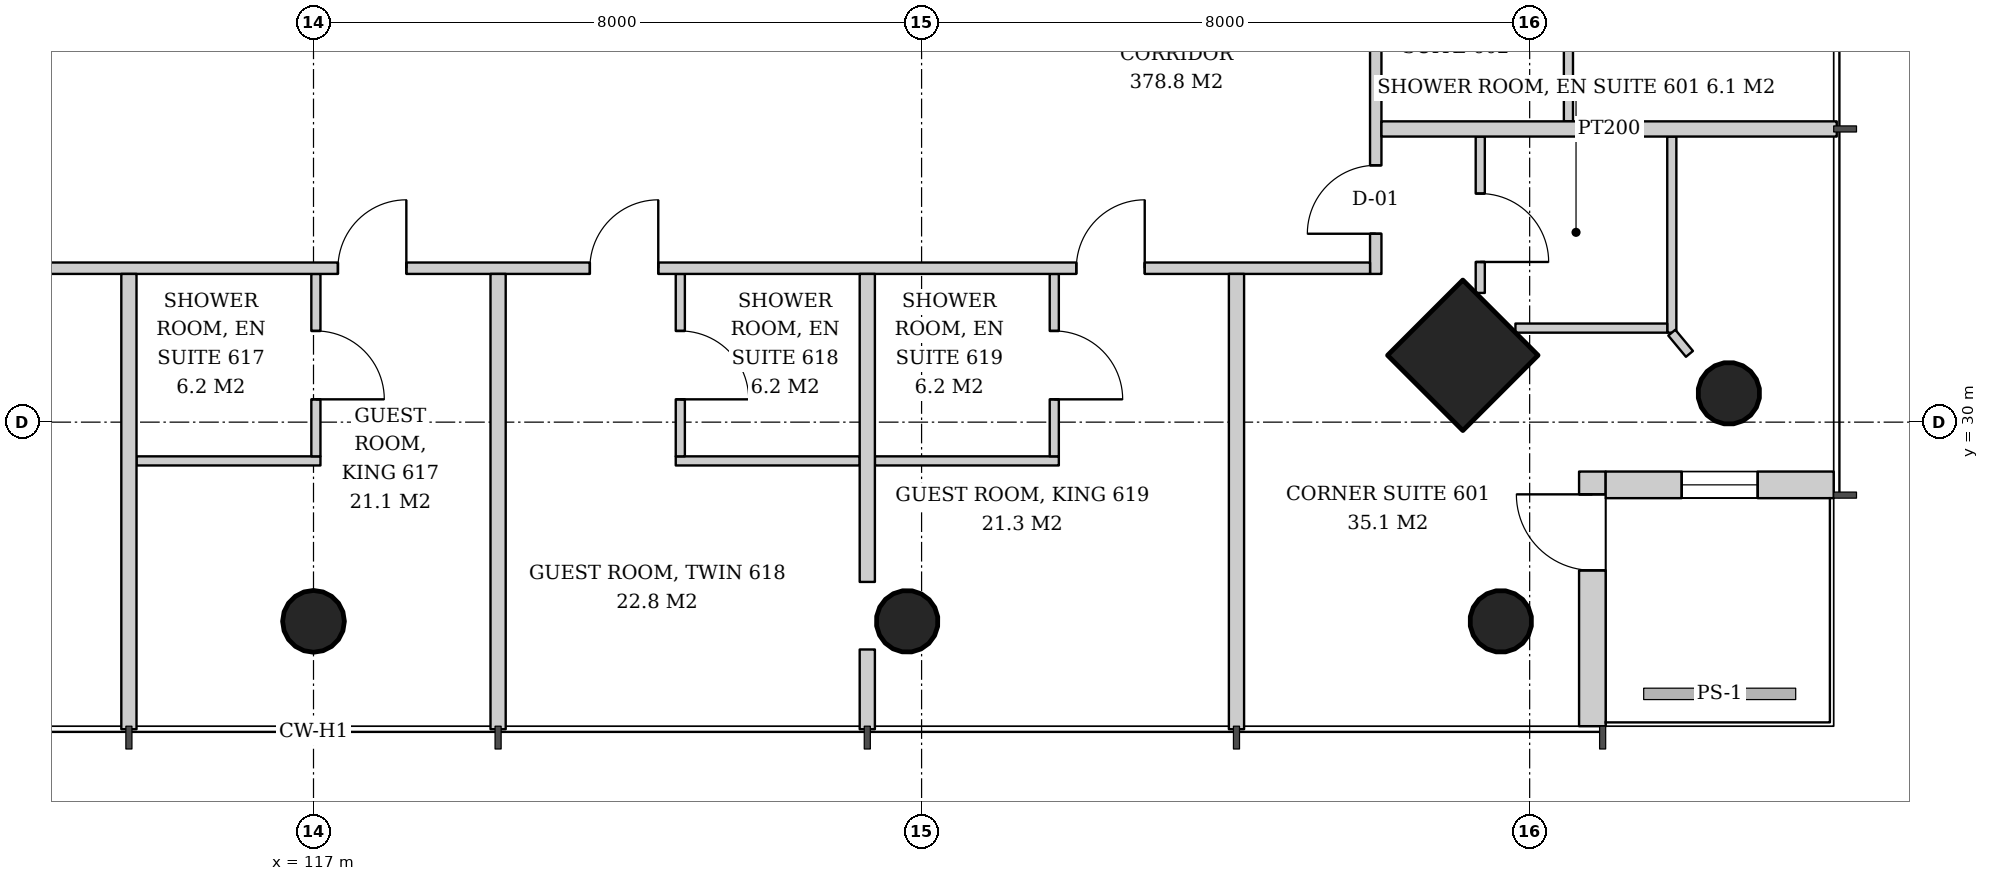
"""IFC4 building model, lengths in metres.
Left out: names, types, materials, properties, quantities, classifications, styles, units other than length and angle.
Written with IfcOpenShell. Run it as: python <this file> out.ifc"""

import sys

from ifc_helpers import new_model, si_unit, direction, frame, frame_2d, origin, origin_2d, place, context, subcontext, project, spatial, rectangle, hollow_circle, extrude, element, fill, save


model = new_model("IFC4")
c1 = context("Model", 3, precision=1e-05, world=origin(), true_north=direction((0.0, 1.0)))
c2 = subcontext(c1, "Body", "Model", "MODEL_VIEW")
j1 = project(units=[si_unit("LENGTHUNIT", "METRE"), si_unit("PLANEANGLEUNIT", "RADIAN")], contexts=[c1])
p1 = place(None, origin())
s1 = spatial("IfcSite", under=j1, at=p1, CompositionType="ELEMENT")
p2 = place(p1, origin())
s2 = spatial("IfcBuilding", under=s1, at=p2, CompositionType="ELEMENT")
p3 = place(p2, frame((0.0, 0.0, 28.6)))
s3 = spatial("IfcBuildingStorey", under=s2, at=p3, CompositionType="ELEMENT", Elevation=28.6)
p4 = place(p3, frame((135.672, 30.328, 0.0), z_axis=(-0.043032401563, 0.043032401563, 0.998146494675), x_axis=(-0.707106781187, -0.707106781187, 0.0)))
e1 = element("IfcColumn", 1, at=p4, inside=s3, PredefinedType="COLUMN", context=c2, shape_type="SweptSolid", body=[
    extrude(hollow_circle(Radius=0.406, WallThickness=0.03, at=origin_2d()), origin(), (0.0, 0.0, 1.0), 3.807),
])
p5 = place(p3, frame((132.172, 30.828, 0.0), z_axis=(-0.043032401563, 0.043032401563, 0.998146494675), x_axis=(-0.707106781187, -0.707106781187, 0.0)))
e2 = element("IfcColumn", 2, at=p5, inside=s3, PredefinedType="COLUMN", context=c2, shape_type="SweptSolid", body=[
    extrude(rectangle(XDim=1.4, YDim=1.4, at=origin_2d()), origin(), (0.0, 0.0, 1.0), 3.807),
])
p6 = place(p3, frame((132.672, 27.328, 0.0), z_axis=(-0.043032401563, 0.043032401563, 0.998146494675), x_axis=(-0.707106781187, -0.707106781187, 0.0)))
e3 = element("IfcColumn", 3, at=p6, inside=s3, PredefinedType="COLUMN", context=c2, shape_type="SweptSolid", body=[
    extrude(hollow_circle(Radius=0.406, WallThickness=0.03, at=origin_2d()), origin(), (0.0, 0.0, 1.0), 3.807),
])
p7 = place(p3, frame((117.0, 27.328, 0.0), z_axis=(0.0, 0.043072300418, 0.999071957837), x_axis=(-1.0, 0.0, 0.0)))
e4 = element("IfcColumn", 4, at=p7, inside=s3, PredefinedType="COLUMN", context=c2, shape_type="SweptSolid", body=[
    extrude(hollow_circle(Radius=0.406, WallThickness=0.03, at=origin_2d()), origin(), (0.0, 0.0, 1.0), 3.803),
])
p8 = place(p3, frame((124.836, 27.328, 0.0), z_axis=(-0.02149908433, 0.04306234503, 0.998841040313), x_axis=(-0.894693706707, -0.446680166538, 0.0)))
e5 = element("IfcColumn", 5, at=p8, inside=s3, PredefinedType="COLUMN", context=c2, shape_type="SweptSolid", body=[
    extrude(hollow_circle(Radius=0.406, WallThickness=0.03, at=origin_2d()), origin(), (0.0, 0.0, 1.0), 3.804),
])
p9 = place(p3, frame((133.825, 26.0, 0.0), z_axis=(0.0, 0.0, 1.0), x_axis=(0.0, 1.0, 0.0)))
e6 = element("IfcWall", 6, at=p9, inside=s3, PredefinedType="SOLIDWALL", context=c2, shape_type="SweptSolid", body=[
    extrude(rectangle(XDim=3.35, YDim=0.35, at=frame_2d((1.675, 0.0))), origin(), (0.0, 0.0, 1.0), 3.6),
])
p10 = place(p9, frame((2.05, 0.0, 0.0)))
e7 = element("IfcOpeningElement", 7, at=p10, cuts=e6, PredefinedType="OPENING", context=c2, shape_type="SweptSolid", body=[
    extrude(rectangle(XDim=1.0, YDim=2.4, at=frame_2d((0.5, 1.2))), frame((0.0, 0.185, 0.0), z_axis=(0.0, -1.0, 0.0), x_axis=(1.0, 0.0, 0.0)), (0.0, 0.0, 1.0), 0.37),
])
p11 = place(p3, frame((134.0, 29.175, 0.0), z_axis=(0.0, 0.0, 1.0), x_axis=(1.0, 0.0, 0.0)))
e8 = element("IfcWall", 8, at=p11, inside=s3, PredefinedType="SOLIDWALL", context=c2, shape_type="SweptSolid", body=[
    extrude(rectangle(XDim=3.0, YDim=0.35, at=frame_2d((1.5, 0.0))), origin(), (0.0, 0.0, 1.0), 3.6),
])
p12 = place(p11, frame((1.0, 0.0, 0.9)))
e9 = element("IfcOpeningElement", 9, at=p12, cuts=e8, PredefinedType="OPENING", context=c2, shape_type="SweptSolid", body=[
    extrude(rectangle(XDim=1.0, YDim=2.4, at=frame_2d((0.5, 1.2))), frame((0.0, 0.185, 0.0), z_axis=(0.0, -1.0, 0.0), x_axis=(1.0, 0.0, 0.0)), (0.0, 0.0, 1.0), 0.37),
])
p13 = place(p3, frame((132.35, 33.757, 0.0), z_axis=(0.0, 0.0, 1.0), x_axis=(0.0, -1.0, 0.0)))
e10 = element("IfcWall", 10, at=p13, inside=s3, PredefinedType="PARTITIONING", context=c2, shape_type="SweptSolid", body=[
    extrude(rectangle(XDim=2.057, YDim=0.12, at=frame_2d((1.029, 0.0))), origin(), (0.0, 0.0, 1.0), 3.6),
])
p14 = place(p13, frame((0.75, 0.0, 0.0)))
e11 = element("IfcOpeningElement", 11, at=p14, cuts=e10, PredefinedType="OPENING", context=c2, shape_type="SweptSolid", body=[
    extrude(rectangle(XDim=0.9, YDim=2.1, at=frame_2d((0.45, 1.05))), frame((0.0, 0.07, 0.0), z_axis=(0.0, -1.0, 0.0), x_axis=(1.0, 0.0, 0.0)), (0.0, 0.0, 1.0), 0.14),
])
p15 = place(p3, frame((134.87, 33.757, 0.0), z_axis=(0.0, 0.0, 1.0), x_axis=(0.0, -1.0, 0.0)))
e12 = element("IfcWall", 12, at=p15, inside=s3, PredefinedType="PARTITIONING", context=c2, shape_type="SweptSolid", body=[
    extrude(rectangle(XDim=2.58, YDim=0.12, at=frame_2d((1.29, 0.0))), origin(), (0.0, 0.0, 1.0), 3.6),
])
p16 = place(p3, frame((132.813, 31.237, 0.0), z_axis=(0.0, 0.0, 1.0), x_axis=(1.0, 0.0, 0.0)))
e13 = element("IfcWall", 13, at=p16, inside=s3, PredefinedType="PARTITIONING", context=c2, shape_type="SweptSolid", body=[
    extrude(rectangle(XDim=1.997, YDim=0.12, at=frame_2d((0.999, 0.0))), origin(), (0.0, 0.0, 1.0), 3.6),
])
p17 = place(p3, frame((133.51, 33.957, 0.0), z_axis=(0.0, 0.0, 1.0), x_axis=(0.0, 1.0, 0.0)))
e14 = element("IfcWall", 14, at=p17, inside=s3, PredefinedType="PARTITIONING", context=c2, shape_type="SweptSolid", body=[
    extrude(rectangle(XDim=2.42, YDim=0.12, at=frame_2d((1.21, 0.0))), origin(), (0.0, 0.0, 1.0), 3.6),
])
p18 = place(p3, frame((130.975, 31.95, 0.0), z_axis=(0.0, 0.0, 1.0), x_axis=(0.0, 1.0, 0.0)))
e15 = element("IfcWall", 15, at=p18, inside=s3, PredefinedType="PARTITIONING", context=c2, shape_type="SweptSolid", body=[
    extrude(rectangle(XDim=27.95, YDim=0.15, at=frame_2d((13.975, 0.0))), origin(), (0.0, 0.0, 1.0), 2.8),
])
p19 = place(p18, frame((0.529, 0.0, 0.0)))
e16 = element("IfcOpeningElement", 16, at=p19, cuts=e15, PredefinedType="OPENING", context=c2, shape_type="SweptSolid", body=[
    extrude(rectangle(XDim=0.9, YDim=2.1, at=frame_2d((0.45, 1.05))), frame((0.0, 0.085, 0.0), z_axis=(0.0, -1.0, 0.0), x_axis=(1.0, 0.0, 0.0)), (0.0, 0.0, 1.0), 0.17),
])
p20 = place(p18, frame((4.657, 0.0, 0.0)))
e17 = element("IfcOpeningElement", 17, at=p20, cuts=e15, PredefinedType="OPENING", context=c2, shape_type="SweptSolid", body=[
    extrude(rectangle(XDim=0.9, YDim=2.1, at=frame_2d((0.45, 1.05))), frame((0.0, 0.085, 0.0), z_axis=(0.0, -1.0, 0.0), x_axis=(1.0, 0.0, 0.0)), (0.0, 0.0, 1.0), 0.17),
])
p21 = place(p18, frame((12.579, 0.0, 0.0)))
e18 = element("IfcOpeningElement", 18, at=p21, cuts=e15, PredefinedType="OPENING", context=c2, shape_type="SweptSolid", body=[
    extrude(rectangle(XDim=0.9, YDim=2.1, at=frame_2d((0.45, 1.05))), frame((0.0, 0.085, 0.0), z_axis=(0.0, -1.0, 0.0), x_axis=(1.0, 0.0, 0.0)), (0.0, 0.0, 1.0), 0.17),
])
p22 = place(p18, frame((19.229, 0.0, 0.0)))
e19 = element("IfcOpeningElement", 19, at=p22, cuts=e15, PredefinedType="OPENING", context=c2, shape_type="SweptSolid", body=[
    extrude(rectangle(XDim=0.9, YDim=2.1, at=frame_2d((0.45, 1.05))), frame((0.0, 0.085, 0.0), z_axis=(0.0, -1.0, 0.0), x_axis=(1.0, 0.0, 0.0)), (0.0, 0.0, 1.0), 0.17),
])
p23 = place(p18, frame((22.543, 0.0, 0.0)))
e20 = element("IfcOpeningElement", 20, at=p23, cuts=e15, PredefinedType="OPENING", context=c2, shape_type="SweptSolid", body=[
    extrude(rectangle(XDim=0.9, YDim=2.1, at=frame_2d((0.45, 1.05))), frame((0.0, 0.085, 0.0), z_axis=(0.0, -1.0, 0.0), x_axis=(1.0, 0.0, 0.0)), (0.0, 0.0, 1.0), 0.17),
])
p24 = place(p3, frame((131.05, 33.857, 0.0), z_axis=(0.0, 0.0, 1.0), x_axis=(1.0, 0.0, 0.0)))
e21 = element("IfcWall", 21, at=p24, inside=s3, PredefinedType="PARTITIONING", context=c2, shape_type="SweptSolid", body=[
    extrude(rectangle(XDim=5.99, YDim=0.2, at=frame_2d((2.995, 0.0))), origin(), (0.0, 0.0, 1.0), 2.847),
])
p25 = place(p3, frame((114.671, 29.49, 0.0), z_axis=(0.0, 0.0, 1.0), x_axis=(1.0, 0.0, 0.0)))
e22 = element("IfcWall", 22, at=p25, inside=s3, PredefinedType="PARTITIONING", context=c2, shape_type="SweptSolid", body=[
    extrude(rectangle(XDim=2.42, YDim=0.12, at=frame_2d((1.21, 0.0))), origin(), (0.0, 0.0, 1.0), 2.847),
])
p26 = place(p3, frame((117.031, 31.95, 0.0), z_axis=(0.0, 0.0, 1.0), x_axis=(0.0, -1.0, 0.0)))
e23 = element("IfcWall", 23, at=p26, inside=s3, PredefinedType="PARTITIONING", context=c2, shape_type="SweptSolid", body=[
    extrude(rectangle(XDim=2.4, YDim=0.12, at=frame_2d((1.2, 0.0))), origin(), (0.0, 0.0, 1.0), 3.6),
])
p27 = place(p26, frame((0.75, 0.0, 0.0)))
e24 = element("IfcOpeningElement", 24, at=p27, cuts=e23, PredefinedType="OPENING", context=c2, shape_type="SweptSolid", body=[
    extrude(rectangle(XDim=0.9, YDim=2.1, at=frame_2d((0.45, 1.05))), frame((0.0, 0.07, 0.0), z_axis=(0.0, -1.0, 0.0), x_axis=(1.0, 0.0, 0.0)), (0.0, 0.0, 1.0), 0.14),
])
p28 = place(p3, frame((121.766, 29.49, 0.0), z_axis=(0.0, 0.0, 1.0), x_axis=(1.0, 0.0, 0.0)))
e25 = element("IfcWall", 25, at=p28, inside=s3, PredefinedType="PARTITIONING", context=c2, shape_type="SweptSolid", body=[
    extrude(rectangle(XDim=2.42, YDim=0.12, at=frame_2d((1.21, 0.0))), origin(), (0.0, 0.0, 1.0), 2.847),
])
p29 = place(p3, frame((121.826, 31.95, 0.0), z_axis=(0.0, 0.0, 1.0), x_axis=(0.0, -1.0, 0.0)))
e26 = element("IfcWall", 26, at=p29, inside=s3, PredefinedType="PARTITIONING", context=c2, shape_type="SweptSolid", body=[
    extrude(rectangle(XDim=2.4, YDim=0.12, at=frame_2d((1.2, 0.0))), origin(), (0.0, 0.0, 1.0), 3.6),
])
p30 = place(p29, frame((0.75, 0.0, 0.0)))
e27 = element("IfcOpeningElement", 27, at=p30, cuts=e26, PredefinedType="OPENING", context=c2, shape_type="SweptSolid", body=[
    extrude(rectangle(XDim=0.9, YDim=2.1, at=frame_2d((0.45, 1.05))), frame((0.0, 0.07, 0.0), z_axis=(0.0, -1.0, 0.0), x_axis=(1.0, 0.0, 0.0)), (0.0, 0.0, 1.0), 0.14),
])
p31 = place(p3, frame((124.386, 29.49, 0.0), z_axis=(0.0, 0.0, 1.0), x_axis=(1.0, 0.0, 0.0)))
e28 = element("IfcWall", 28, at=p31, inside=s3, PredefinedType="PARTITIONING", context=c2, shape_type="SweptSolid", body=[
    extrude(rectangle(XDim=2.42, YDim=0.12, at=frame_2d((1.21, 0.0))), origin(), (0.0, 0.0, 1.0), 3.6),
])
p32 = place(p3, frame((126.746, 31.95, 0.0), z_axis=(0.0, 0.0, 1.0), x_axis=(0.0, -1.0, 0.0)))
e29 = element("IfcWall", 29, at=p32, inside=s3, PredefinedType="PARTITIONING", context=c2, shape_type="SweptSolid", body=[
    extrude(rectangle(XDim=2.4, YDim=0.12, at=frame_2d((1.2, 0.0))), origin(), (0.0, 0.0, 1.0), 3.6),
])
p33 = place(p32, frame((0.75, 0.0, 0.0)))
e30 = element("IfcOpeningElement", 30, at=p33, cuts=e29, PredefinedType="OPENING", context=c2, shape_type="SweptSolid", body=[
    extrude(rectangle(XDim=0.9, YDim=2.1, at=frame_2d((0.45, 1.05))), frame((0.0, 0.07, 0.0), z_axis=(0.0, -1.0, 0.0), x_axis=(1.0, 0.0, 0.0)), (0.0, 0.0, 1.0), 0.14),
])
p34 = place(p3, frame((102.95, 32.025, 0.0), z_axis=(0.0, 0.0, 1.0), x_axis=(1.0, 0.0, 0.0)))
e31 = element("IfcWall", 31, at=p34, inside=s3, PredefinedType="PARTITIONING", context=c2, shape_type="SweptSolid", body=[
    extrude(rectangle(XDim=27.95, YDim=0.15, at=frame_2d((13.975, 0.0))), origin(), (0.0, 0.0, 1.0), 2.8),
])
p35 = place(p34, frame((0.529, 0.0, 0.0)))
e32 = element("IfcOpeningElement", 32, at=p35, cuts=e31, PredefinedType="OPENING", context=c2, shape_type="SweptSolid", body=[
    extrude(rectangle(XDim=0.9, YDim=2.1, at=frame_2d((0.45, 1.05))), frame((0.0, 0.085, 0.0), z_axis=(0.0, -1.0, 0.0), x_axis=(1.0, 0.0, 0.0)), (0.0, 0.0, 1.0), 0.17),
])
p36 = place(p34, frame((4.657, 0.0, 0.0)))
e33 = element("IfcOpeningElement", 33, at=p36, cuts=e31, PredefinedType="OPENING", context=c2, shape_type="SweptSolid", body=[
    extrude(rectangle(XDim=0.9, YDim=2.1, at=frame_2d((0.45, 1.05))), frame((0.0, 0.085, 0.0), z_axis=(0.0, -1.0, 0.0), x_axis=(1.0, 0.0, 0.0)), (0.0, 0.0, 1.0), 0.17),
])
p37 = place(p34, frame((14.371, 0.0, 0.0)))
e34 = element("IfcOpeningElement", 34, at=p37, cuts=e31, PredefinedType="OPENING", context=c2, shape_type="SweptSolid", body=[
    extrude(rectangle(XDim=0.9, YDim=2.1, at=frame_2d((0.45, 1.05))), frame((0.0, 0.085, 0.0), z_axis=(0.0, -1.0, 0.0), x_axis=(1.0, 0.0, 0.0)), (0.0, 0.0, 1.0), 0.17),
])
p38 = place(p34, frame((17.686, 0.0, 0.0)))
e35 = element("IfcOpeningElement", 35, at=p38, cuts=e31, PredefinedType="OPENING", context=c2, shape_type="SweptSolid", body=[
    extrude(rectangle(XDim=0.9, YDim=2.1, at=frame_2d((0.45, 1.05))), frame((0.0, 0.085, 0.0), z_axis=(0.0, -1.0, 0.0), x_axis=(1.0, 0.0, 0.0)), (0.0, 0.0, 1.0), 0.17),
])
p39 = place(p34, frame((24.086, 0.0, 0.0)))
e36 = element("IfcOpeningElement", 36, at=p39, cuts=e31, PredefinedType="OPENING", context=c2, shape_type="SweptSolid", body=[
    extrude(rectangle(XDim=0.9, YDim=2.1, at=frame_2d((0.45, 1.05))), frame((0.0, 0.085, 0.0), z_axis=(0.0, -1.0, 0.0), x_axis=(1.0, 0.0, 0.0)), (0.0, 0.0, 1.0), 0.17),
])
for number, where, z_axis, x_axis in (
    (37, (114.572, 31.95, 0.0), (0.0, 0.0, 1.0), (0.0, -1.0, 0.0)),
    (38, (119.428, 31.95, 0.0), (0.0, 0.0, 1.0), (0.0, -1.0, 0.0)),
):
    element("IfcWall", number, at=place(p3, frame(where, z_axis=z_axis, x_axis=x_axis)), inside=s3, PredefinedType="PARTITIONING", context=c2, shape_type="SweptSolid", body=[
        extrude(rectangle(XDim=5.99, YDim=0.2, at=frame_2d((2.995, 0.0))), origin(), (0.0, 0.0, 1.0), 3.05),
    ])
p40 = place(p3, frame((124.286, 31.95, 0.0), z_axis=(0.0, 0.0, 1.0), x_axis=(0.0, -1.0, 0.0)))
e39 = element("IfcWall", 39, at=p40, inside=s3, PredefinedType="PARTITIONING", context=c2, shape_type="SweptSolid", body=[
    extrude(rectangle(XDim=4.052, YDim=0.2, at=frame_2d((2.026, 0.0))), origin(), (0.0, 0.0, 1.0), 3.6),
])
p41 = place(p3, frame((124.286, 27.009, 0.0), z_axis=(0.0, 0.0, 1.0), x_axis=(0.0, -1.0, 0.0)))
e40 = element("IfcWall", 40, at=p41, inside=s3, PredefinedType="PARTITIONING", context=c2, shape_type="SweptSolid", body=[
    extrude(rectangle(XDim=1.049, YDim=0.2, at=frame_2d((0.524, 0.0))), origin(), (0.0, 0.0, 1.0), 3.6),
])
p42 = place(p3, frame((129.143, 31.95, 0.0), z_axis=(0.0, 0.0, 1.0), x_axis=(0.0, -1.0, 0.0)))
e41 = element("IfcWall", 41, at=p42, inside=s3, PredefinedType="PARTITIONING", context=c2, shape_type="SweptSolid", body=[
    extrude(rectangle(XDim=5.99, YDim=0.2, at=frame_2d((2.995, 0.0))), origin(), (0.0, 0.0, 1.0), 3.05),
])
p43 = place(p3, frame((134.87, 31.177, 0.0), z_axis=(0.0, 0.0, 1.0), x_axis=(0.638860529582, -0.76932257457, 0.0)))
e42 = element("IfcWall", 42, at=p43, inside=s3, PredefinedType="PARTITIONING", context=c2, shape_type="SweptSolid", body=[
    extrude(rectangle(XDim=0.363, YDim=0.12, at=frame_2d((0.182, 0.0))), origin(), (0.0, 0.0, 1.0), 3.6),
])
p44 = place(p10, origin())
e43 = element("IfcDoor", 43, at=p44, inside=s3, OperationType="SINGLE_SWING_RIGHT", PredefinedType="DOOR", context=c2, shape_type="SweptSolid", body=[
    extrude(rectangle(XDim=1.0, YDim=2.4, at=frame_2d((0.5, 1.2))), frame((0.0, 0.025, 0.0), z_axis=(0.0, -1.0, 0.0), x_axis=(1.0, 0.0, 0.0)), (0.0, 0.0, 1.0), 0.05),
])
fill(e7, e43)
p45 = place(p12, origin())
e44 = element("IfcWindow", 44, at=p45, inside=s3, PartitioningType="SINGLE_PANEL", PredefinedType="WINDOW", context=c2, shape_type="SweptSolid", body=[
    extrude(rectangle(XDim=1.0, YDim=2.4, at=frame_2d((0.5, 1.2))), frame((0.0, 0.03, 0.0), z_axis=(0.0, -1.0, 0.0), x_axis=(1.0, 0.0, 0.0)), (0.0, 0.0, 1.0), 0.06),
])
fill(e9, e44)
p46 = place(p14, origin())
e45 = element("IfcDoor", 45, at=p46, inside=s3, OperationType="SINGLE_SWING_RIGHT", PredefinedType="DOOR", context=c2, shape_type="SweptSolid", body=[
    extrude(rectangle(XDim=0.9, YDim=2.1, at=frame_2d((0.45, 1.05))), frame((0.0, 0.025, 0.0), z_axis=(0.0, -1.0, 0.0), x_axis=(1.0, 0.0, 0.0)), (0.0, 0.0, 1.0), 0.05),
])
fill(e11, e45)
p47 = place(p19, origin())
e46 = element("IfcDoor", 46, at=p47, inside=s3, OperationType="SINGLE_SWING_LEFT", PredefinedType="DOOR", context=c2, shape_type="SweptSolid", body=[
    extrude(rectangle(XDim=0.9, YDim=2.1, at=frame_2d((0.45, 1.05))), frame((0.0, 0.025, 0.0), z_axis=(0.0, -1.0, 0.0), x_axis=(1.0, 0.0, 0.0)), (0.0, 0.0, 1.0), 0.05),
])
fill(e16, e46)
p48 = place(p27, origin())
e47 = element("IfcDoor", 47, at=p48, inside=s3, OperationType="SINGLE_SWING_RIGHT", PredefinedType="DOOR", context=c2, shape_type="SweptSolid", body=[
    extrude(rectangle(XDim=0.9, YDim=2.1, at=frame_2d((0.45, 1.05))), frame((0.0, 0.025, 0.0), z_axis=(0.0, -1.0, 0.0), x_axis=(1.0, 0.0, 0.0)), (0.0, 0.0, 1.0), 0.05),
])
fill(e24, e47)
p49 = place(p30, origin())
e48 = element("IfcDoor", 48, at=p49, inside=s3, OperationType="SINGLE_SWING_RIGHT", PredefinedType="DOOR", context=c2, shape_type="SweptSolid", body=[
    extrude(rectangle(XDim=0.9, YDim=2.1, at=frame_2d((0.45, 1.05))), frame((0.0, 0.025, 0.0), z_axis=(0.0, -1.0, 0.0), x_axis=(1.0, 0.0, 0.0)), (0.0, 0.0, 1.0), 0.05),
])
fill(e27, e48)
p50 = place(p33, origin())
e49 = element("IfcDoor", 49, at=p50, inside=s3, OperationType="SINGLE_SWING_RIGHT", PredefinedType="DOOR", context=c2, shape_type="SweptSolid", body=[
    extrude(rectangle(XDim=0.9, YDim=2.1, at=frame_2d((0.45, 1.05))), frame((0.0, 0.025, 0.0), z_axis=(0.0, -1.0, 0.0), x_axis=(1.0, 0.0, 0.0)), (0.0, 0.0, 1.0), 0.05),
])
fill(e30, e49)
p51 = place(p37, origin())
e50 = element("IfcDoor", 50, at=p51, inside=s3, OperationType="SINGLE_SWING_RIGHT", PredefinedType="DOOR", context=c2, shape_type="SweptSolid", body=[
    extrude(rectangle(XDim=0.9, YDim=2.1, at=frame_2d((0.45, 1.05))), frame((0.0, 0.025, 0.0), z_axis=(0.0, -1.0, 0.0), x_axis=(1.0, 0.0, 0.0)), (0.0, 0.0, 1.0), 0.05),
])
fill(e34, e50)
p52 = place(p38, origin())
e51 = element("IfcDoor", 51, at=p52, inside=s3, OperationType="SINGLE_SWING_RIGHT", PredefinedType="DOOR", context=c2, shape_type="SweptSolid", body=[
    extrude(rectangle(XDim=0.9, YDim=2.1, at=frame_2d((0.45, 1.05))), frame((0.0, 0.025, 0.0), z_axis=(0.0, -1.0, 0.0), x_axis=(1.0, 0.0, 0.0)), (0.0, 0.0, 1.0), 0.05),
])
fill(e35, e51)
p53 = place(p39, origin())
e52 = element("IfcDoor", 52, at=p53, inside=s3, OperationType="SINGLE_SWING_RIGHT", PredefinedType="DOOR", context=c2, shape_type="SweptSolid", body=[
    extrude(rectangle(XDim=0.9, YDim=2.1, at=frame_2d((0.45, 1.05))), frame((0.0, 0.025, 0.0), z_axis=(0.0, -1.0, 0.0), x_axis=(1.0, 0.0, 0.0)), (0.0, 0.0, 1.0), 0.05),
])
fill(e36, e52)
save(model, sys.argv[1])
